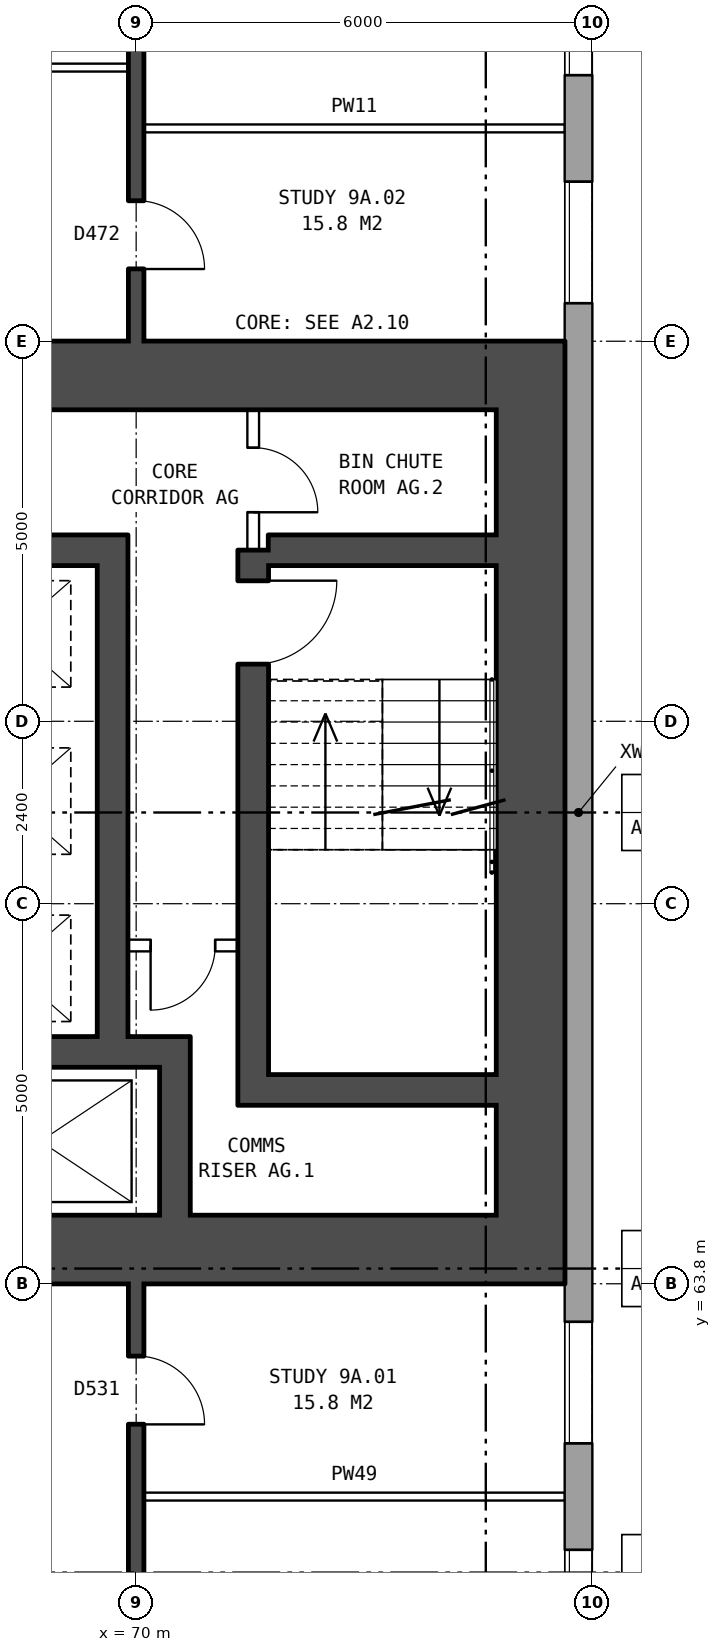
"""IFC4 building model, lengths in metres.
Left out: names, types, materials, properties, quantities, classifications, styles, units other than length and angle.
Written with IfcOpenShell. Run it as: python <this file> out.ifc"""

import sys

from ifc_helpers import new_model, si_unit, direction, frame, frame_2d, origin, place, context, subcontext, project, spatial, rectangle, extrude, element, fill, save


model = new_model("IFC4")
c1 = context("Model", 3, precision=1e-05, world=origin(), true_north=direction((0.0, 1.0)))
c2 = subcontext(c1, "Body", "Model", "MODEL_VIEW")
j1 = project(units=[si_unit("LENGTHUNIT", "METRE"), si_unit("PLANEANGLEUNIT", "RADIAN")], contexts=[c1])
p1 = place(None, origin())
s1 = spatial("IfcSite", under=j1, at=p1, CompositionType="ELEMENT")
p2 = place(p1, origin())
s2 = spatial("IfcBuilding", under=s1, at=p2, CompositionType="ELEMENT")
p3 = place(p2, frame((0.0, 0.0, 35.0)))
s3 = spatial("IfcBuildingStorey", under=s2, at=p3, CompositionType="ELEMENT", Elevation=35.0)
p4 = place(p3, frame((75.82, 57.075, 0.0), z_axis=(0.0, 0.0, 1.0), x_axis=(0.0, 1.0, 0.0)))
e1 = element("IfcWall", 1, at=p4, inside=s3, PredefinedType="STANDARD", context=c2, shape_type="SweptSolid", body=[
    extrude(rectangle(XDim=25.851, YDim=0.36, at=frame_2d((12.925, 0.0))), origin(), (0.0, 0.0, 1.0), 2.85),
])
p5 = place(p4, frame((1.625, 0.0, 0.8)))
e2 = element("IfcOpeningElement", 2, at=p5, cuts=e1, PredefinedType="OPENING", context=c2, shape_type="SweptSolid", body=[
    extrude(rectangle(XDim=1.6, YDim=1.8, at=frame_2d((0.8, 0.9))), frame((0.0, 0.19, 0.0), z_axis=(0.0, -1.0, 0.0), x_axis=(1.0, 0.0, 0.0)), (0.0, 0.0, 1.0), 0.38),
])
p6 = place(p4, frame((4.625, 0.0, 0.8)))
e3 = element("IfcOpeningElement", 3, at=p6, cuts=e1, PredefinedType="OPENING", context=c2, shape_type="SweptSolid", body=[
    extrude(rectangle(XDim=1.6, YDim=1.8, at=frame_2d((0.8, 0.9))), frame((0.0, 0.19, 0.0), z_axis=(0.0, -1.0, 0.0), x_axis=(1.0, 0.0, 0.0)), (0.0, 0.0, 1.0), 0.38),
])
p7 = place(p4, frame((19.625, 0.0, 0.8)))
e4 = element("IfcOpeningElement", 4, at=p7, cuts=e1, PredefinedType="OPENING", context=c2, shape_type="SweptSolid", body=[
    extrude(rectangle(XDim=1.6, YDim=1.8, at=frame_2d((0.8, 0.9))), frame((0.0, 0.19, 0.0), z_axis=(0.0, -1.0, 0.0), x_axis=(1.0, 0.0, 0.0)), (0.0, 0.0, 1.0), 0.38),
])
p8 = place(p4, frame((22.625, 0.0, 0.8)))
e5 = element("IfcOpeningElement", 5, at=p8, cuts=e1, PredefinedType="OPENING", context=c2, shape_type="SweptSolid", body=[
    extrude(rectangle(XDim=1.6, YDim=1.8, at=frame_2d((0.8, 0.9))), frame((0.0, 0.19, 0.0), z_axis=(0.0, -1.0, 0.0), x_axis=(1.0, 0.0, 0.0)), (0.0, 0.0, 1.0), 0.38),
])
p9 = place(p3, frame((75.19, 64.7, 0.0), z_axis=(0.0, 0.0, 1.0), x_axis=(0.0, 1.0, 0.0)))
e6 = element("IfcWall", 6, at=p9, inside=s3, PredefinedType="SHEAR", context=c2, shape_type="SweptSolid", body=[
    extrude(rectangle(XDim=10.6, YDim=0.9, at=frame_2d((5.3, 0.0))), origin(), (0.0, 0.0, 1.0), 2.85),
])
for number, where, z_axis, x_axis in (
    (7, (66.64, 64.25, 0.0), (0.0, 0.0, 1.0), (1.0, 0.0, 0.0)),
    (8, (66.64, 75.75, 0.0), (0.0, 0.0, 1.0), (1.0, 0.0, 0.0)),
):
    element("IfcWall", number, at=place(p3, frame(where, z_axis=z_axis, x_axis=x_axis)), inside=s3, PredefinedType="SHEAR", context=c2, shape_type="SweptSolid", body=[
        extrude(rectangle(XDim=9.0, YDim=0.9, at=frame_2d((4.5, 0.0))), origin(), (0.0, 0.0, 1.0), 2.85),
    ])
p10 = place(p3, frame((71.74, 66.35, 0.0), z_axis=(0.0, 0.0, 1.0), x_axis=(1.0, 0.0, 0.0)))
e9 = element("IfcWall", 9, at=p10, inside=s3, PredefinedType="SHEAR", context=c2, shape_type="SweptSolid", body=[
    extrude(rectangle(XDim=3.0, YDim=0.4, at=frame_2d((1.5, 0.0))), origin(), (0.0, 0.0, 1.0), 2.85),
])
p11 = place(p3, frame((67.54, 66.85, 0.0), z_axis=(0.0, 0.0, 1.0), x_axis=(1.0, 0.0, 0.0)))
e10 = element("IfcWall", 10, at=p11, inside=s3, PredefinedType="SHEAR", context=c2, shape_type="SweptSolid", body=[
    extrude(rectangle(XDim=3.17, YDim=0.4, at=frame_2d((1.585, 0.0))), origin(), (0.0, 0.0, 1.0), 2.85),
])
p12 = place(p3, frame((69.89, 68.25, 0.0), z_axis=(0.0, 0.0, 1.0), x_axis=(1.0, 0.0, 0.0)))
e11 = element("IfcWall", 11, at=p12, inside=s3, PredefinedType="PARTITIONING", context=c2, shape_type="SweptSolid", body=[
    extrude(rectangle(XDim=1.45, YDim=0.15, at=frame_2d((0.725, 0.0))), origin(), (0.0, 0.0, 1.0), 2.85),
])
p13 = place(p12, frame((0.3, 0.0, 0.0)))
e12 = element("IfcOpeningElement", 12, at=p13, cuts=e11, PredefinedType="OPENING", context=c2, shape_type="SweptSolid", body=[
    extrude(rectangle(XDim=0.85, YDim=2.1, at=frame_2d((0.425, 1.05))), frame((0.0, 0.085, 0.0), z_axis=(0.0, -1.0, 0.0), x_axis=(1.0, 0.0, 0.0)), (0.0, 0.0, 1.0), 0.17),
])
p14 = place(p3, frame((67.54, 73.45, 0.0), z_axis=(0.0, 0.0, 1.0), x_axis=(1.0, 0.0, 0.0)))
e13 = element("IfcWall", 13, at=p14, inside=s3, PredefinedType="SHEAR", context=c2, shape_type="SweptSolid", body=[
    extrude(rectangle(XDim=1.95, YDim=0.4, at=frame_2d((0.975, 0.0))), origin(), (0.0, 0.0, 1.0), 2.85),
])
p15 = place(p3, frame((71.74, 73.45, 0.0), z_axis=(0.0, 0.0, 1.0), x_axis=(1.0, 0.0, 0.0)))
e14 = element("IfcWall", 14, at=p15, inside=s3, PredefinedType="SHEAR", context=c2, shape_type="SweptSolid", body=[
    extrude(rectangle(XDim=3.0, YDim=0.4, at=frame_2d((1.5, 0.0))), origin(), (0.0, 0.0, 1.0), 2.85),
])
p16 = place(p3, frame((69.69, 67.05, 0.0), z_axis=(0.0, 0.0, 1.0), x_axis=(0.0, 1.0, 0.0)))
e15 = element("IfcWall", 15, at=p16, inside=s3, PredefinedType="SHEAR", context=c2, shape_type="SweptSolid", body=[
    extrude(rectangle(XDim=6.6, YDim=0.4, at=frame_2d((3.3, 0.0))), origin(), (0.0, 0.0, 1.0), 2.85),
])
p17 = place(p3, frame((70.51, 64.7, 0.0), z_axis=(0.0, 0.0, 1.0), x_axis=(0.0, 1.0, 0.0)))
e16 = element("IfcWall", 16, at=p17, inside=s3, PredefinedType="SHEAR", context=c2, shape_type="SweptSolid", body=[
    extrude(rectangle(XDim=1.95, YDim=0.4, at=frame_2d((0.975, 0.0))), origin(), (0.0, 0.0, 1.0), 2.85),
])
p18 = place(p3, frame((71.54, 66.15, 0.0), z_axis=(0.0, 0.0, 1.0), x_axis=(0.0, 1.0, 0.0)))
e17 = element("IfcWall", 17, at=p18, inside=s3, PredefinedType="SHEAR", context=c2, shape_type="SweptSolid", body=[
    extrude(rectangle(XDim=7.3, YDim=0.4, at=frame_2d((3.65, 0.0))), origin(), (0.0, 0.0, 1.0), 2.85),
])
p19 = place(p18, frame((5.8, 0.0, 0.0)))
e18 = element("IfcOpeningElement", 18, at=p19, cuts=e17, PredefinedType="OPENING", context=c2, shape_type="SweptSolid", body=[
    extrude(rectangle(XDim=1.1, YDim=2.1, at=frame_2d((0.55, 1.05))), frame((0.0, 0.21, 0.0), z_axis=(0.0, -1.0, 0.0), x_axis=(1.0, 0.0, 0.0)), (0.0, 0.0, 1.0), 0.42),
])
p20 = place(p3, frame((71.54, 73.45, 0.0), z_axis=(0.0, 0.0, 1.0), x_axis=(0.0, 1.0, 0.0)))
e19 = element("IfcWall", 19, at=p20, inside=s3, PredefinedType="PARTITIONING", context=c2, shape_type="SweptSolid", body=[
    extrude(rectangle(XDim=1.85, YDim=0.15, at=frame_2d((0.925, 0.0))), origin(), (0.0, 0.0, 1.0), 2.85),
])
p21 = place(p20, frame((0.5, 0.0, 0.0)))
e20 = element("IfcOpeningElement", 20, at=p21, cuts=e19, PredefinedType="OPENING", context=c2, shape_type="SweptSolid", body=[
    extrude(rectangle(XDim=0.85, YDim=2.1, at=frame_2d((0.425, 1.05))), frame((0.0, 0.085, 0.0), z_axis=(0.0, -1.0, 0.0), x_axis=(1.0, 0.0, 0.0)), (0.0, 0.0, 1.0), 0.17),
])
for number, where, z_axis, x_axis in (
    (21, (70.1, 61.0, 0.0), (0.0, 0.0, 1.0), (1.0, 0.0, 0.0)),
    (22, (70.1, 79.0, 0.0), (0.0, 0.0, 1.0), (1.0, 0.0, 0.0)),
):
    element("IfcWall", number, at=place(p3, frame(where, z_axis=z_axis, x_axis=x_axis)), inside=s3, PredefinedType="PARTITIONING", context=c2, shape_type="SweptSolid", body=[
        extrude(rectangle(XDim=5.54, YDim=0.1, at=frame_2d((2.77, 0.0))), origin(), (0.0, 0.0, 1.0), 2.85),
    ])
p22 = place(p3, frame((64.1, 79.8, 0.0), z_axis=(0.0, 0.0, 1.0), x_axis=(1.0, 0.0, 0.0)))
e23 = element("IfcWall", 23, at=p22, inside=s3, PredefinedType="PARTITIONING", context=c2, shape_type="SweptSolid", body=[
    extrude(rectangle(XDim=5.8, YDim=0.1, at=frame_2d((2.9, 0.0))), origin(), (0.0, 0.0, 1.0), 2.85),
])
p23 = place(p22, frame((3.6, 0.0, 0.0)))
e24 = element("IfcOpeningElement", 24, at=p23, cuts=e23, PredefinedType="OPENING", context=c2, shape_type="SweptSolid", body=[
    extrude(rectangle(XDim=0.9, YDim=2.1, at=frame_2d((0.45, 1.05))), frame((0.0, 0.06, 0.0), z_axis=(0.0, -1.0, 0.0), x_axis=(1.0, 0.0, 0.0)), (0.0, 0.0, 1.0), 0.12),
])
p24 = place(p22, frame((0.7, 0.0, 0.0)))
e25 = element("IfcOpeningElement", 25, at=p24, cuts=e23, PredefinedType="OPENING", context=c2, shape_type="SweptSolid", body=[
    extrude(rectangle(XDim=0.9, YDim=2.1, at=frame_2d((0.45, 1.05))), frame((0.0, 0.06, 0.0), z_axis=(0.0, -1.0, 0.0), x_axis=(1.0, 0.0, 0.0)), (0.0, 0.0, 1.0), 0.12),
])
p25 = place(p3, frame((70.0, 54.36, 0.0), z_axis=(0.0, 0.0, 1.0), x_axis=(0.0, 1.0, 0.0)))
e26 = element("IfcWall", 26, at=p25, inside=s3, PredefinedType="SOLIDWALL", context=c2, shape_type="SweptSolid", body=[
    extrude(rectangle(XDim=9.44, YDim=0.2, at=frame_2d((4.72, 0.0))), origin(), (0.0, 0.0, 1.0), 2.85),
])
p26 = place(p25, frame((2.32, 0.0, 0.0)))
e27 = element("IfcOpeningElement", 27, at=p26, cuts=e26, PredefinedType="OPENING", context=c2, shape_type="SweptSolid", body=[
    extrude(rectangle(XDim=0.9, YDim=2.1, at=frame_2d((0.45, 1.05))), frame((0.0, 0.11, 0.0), z_axis=(0.0, -1.0, 0.0), x_axis=(1.0, 0.0, 0.0)), (0.0, 0.0, 1.0), 0.22),
])
p27 = place(p25, frame((7.59, 0.0, 0.0)))
e28 = element("IfcOpeningElement", 28, at=p27, cuts=e26, PredefinedType="OPENING", context=c2, shape_type="SweptSolid", body=[
    extrude(rectangle(XDim=0.9, YDim=2.1, at=frame_2d((0.45, 1.05))), frame((0.0, 0.11, 0.0), z_axis=(0.0, -1.0, 0.0), x_axis=(1.0, 0.0, 0.0)), (0.0, 0.0, 1.0), 0.22),
])
p28 = place(p3, frame((70.0, 76.2, 0.0), z_axis=(0.0, 0.0, 1.0), x_axis=(0.0, 1.0, 0.0)))
e29 = element("IfcWall", 29, at=p28, inside=s3, PredefinedType="SOLIDWALL", context=c2, shape_type="SweptSolid", body=[
    extrude(rectangle(XDim=9.44, YDim=0.2, at=frame_2d((4.72, 0.0))), origin(), (0.0, 0.0, 1.0), 2.85),
])
p29 = place(p28, frame((6.07, 0.0, 0.0)))
e30 = element("IfcOpeningElement", 30, at=p29, cuts=e29, PredefinedType="OPENING", context=c2, shape_type="SweptSolid", body=[
    extrude(rectangle(XDim=0.9, YDim=2.1, at=frame_2d((0.45, 1.05))), frame((0.0, 0.11, 0.0), z_axis=(0.0, -1.0, 0.0), x_axis=(1.0, 0.0, 0.0)), (0.0, 0.0, 1.0), 0.22),
])
p30 = place(p28, frame((0.95, 0.0, 0.0)))
e31 = element("IfcOpeningElement", 31, at=p30, cuts=e29, PredefinedType="OPENING", context=c2, shape_type="SweptSolid", body=[
    extrude(rectangle(XDim=0.9, YDim=2.1, at=frame_2d((0.45, 1.05))), frame((0.0, 0.11, 0.0), z_axis=(0.0, -1.0, 0.0), x_axis=(1.0, 0.0, 0.0)), (0.0, 0.0, 1.0), 0.22),
])
p31 = place(p5, origin())
e32 = element("IfcWindow", 32, at=p31, inside=s3, PartitioningType="SINGLE_PANEL", PredefinedType="WINDOW", context=c2, shape_type="SweptSolid", body=[
    extrude(rectangle(XDim=1.6, YDim=1.8, at=frame_2d((0.8, 0.9))), frame((0.0, 0.15, 0.0), z_axis=(0.0, -1.0, 0.0), x_axis=(1.0, 0.0, 0.0)), (0.0, 0.0, 1.0), 0.06),
])
fill(e2, e32)
p32 = place(p6, origin())
e33 = element("IfcWindow", 33, at=p32, inside=s3, PartitioningType="SINGLE_PANEL", PredefinedType="WINDOW", context=c2, shape_type="SweptSolid", body=[
    extrude(rectangle(XDim=1.6, YDim=1.8, at=frame_2d((0.8, 0.9))), frame((0.0, 0.15, 0.0), z_axis=(0.0, -1.0, 0.0), x_axis=(1.0, 0.0, 0.0)), (0.0, 0.0, 1.0), 0.06),
])
fill(e3, e33)
p33 = place(p7, origin())
e34 = element("IfcWindow", 34, at=p33, inside=s3, PartitioningType="SINGLE_PANEL", PredefinedType="WINDOW", context=c2, shape_type="SweptSolid", body=[
    extrude(rectangle(XDim=1.6, YDim=1.8, at=frame_2d((0.8, 0.9))), frame((0.0, 0.15, 0.0), z_axis=(0.0, -1.0, 0.0), x_axis=(1.0, 0.0, 0.0)), (0.0, 0.0, 1.0), 0.06),
])
fill(e4, e34)
p34 = place(p8, origin())
e35 = element("IfcWindow", 35, at=p34, inside=s3, PartitioningType="SINGLE_PANEL", PredefinedType="WINDOW", context=c2, shape_type="SweptSolid", body=[
    extrude(rectangle(XDim=1.6, YDim=1.8, at=frame_2d((0.8, 0.9))), frame((0.0, 0.15, 0.0), z_axis=(0.0, -1.0, 0.0), x_axis=(1.0, 0.0, 0.0)), (0.0, 0.0, 1.0), 0.06),
])
fill(e5, e35)
p35 = place(p19, frame((1.1, 0.0, 0.0), z_axis=(0.0, 0.0, 1.0), x_axis=(-1.0, 0.0, 0.0)))
e36 = element("IfcDoor", 36, at=p35, inside=s3, OperationType="SINGLE_SWING_LEFT", PredefinedType="DOOR", context=c2, shape_type="SweptSolid", body=[
    extrude(rectangle(XDim=1.1, YDim=2.1, at=frame_2d((0.55, 1.05))), frame((0.0, 0.025, 0.0), z_axis=(0.0, -1.0, 0.0), x_axis=(1.0, 0.0, 0.0)), (0.0, 0.0, 1.0), 0.05),
])
fill(e18, e36)
p36 = place(p13, frame((0.85, 0.0, 0.0), z_axis=(0.0, 0.0, 1.0), x_axis=(-1.0, 0.0, 0.0)))
e37 = element("IfcDoor", 37, at=p36, inside=s3, OperationType="SINGLE_SWING_RIGHT", PredefinedType="DOOR", context=c2, shape_type="SweptSolid", body=[
    extrude(rectangle(XDim=0.85, YDim=2.1, at=frame_2d((0.425, 1.05))), frame((0.0, 0.025, 0.0), z_axis=(0.0, -1.0, 0.0), x_axis=(1.0, 0.0, 0.0)), (0.0, 0.0, 1.0), 0.05),
])
fill(e12, e37)
p37 = place(p21, frame((0.85, 0.0, 0.0), z_axis=(0.0, 0.0, 1.0), x_axis=(-1.0, 0.0, 0.0)))
e38 = element("IfcDoor", 38, at=p37, inside=s3, OperationType="SINGLE_SWING_RIGHT", PredefinedType="DOOR", context=c2, shape_type="SweptSolid", body=[
    extrude(rectangle(XDim=0.85, YDim=2.1, at=frame_2d((0.425, 1.05))), frame((0.0, 0.025, 0.0), z_axis=(0.0, -1.0, 0.0), x_axis=(1.0, 0.0, 0.0)), (0.0, 0.0, 1.0), 0.05),
])
fill(e20, e38)
p38 = place(p27, frame((0.9, 0.0, 0.0), z_axis=(0.0, 0.0, 1.0), x_axis=(-1.0, 0.0, 0.0)))
e39 = element("IfcDoor", 39, at=p38, inside=s3, OperationType="SINGLE_SWING_RIGHT", PredefinedType="DOOR", context=c2, shape_type="SweptSolid", body=[
    extrude(rectangle(XDim=0.9, YDim=2.1, at=frame_2d((0.45, 1.05))), frame((0.0, 0.025, 0.0), z_axis=(0.0, -1.0, 0.0), x_axis=(1.0, 0.0, 0.0)), (0.0, 0.0, 1.0), 0.05),
])
fill(e28, e39)
p39 = place(p30, frame((0.9, 0.0, 0.0), z_axis=(0.0, 0.0, 1.0), x_axis=(-1.0, 0.0, 0.0)))
e40 = element("IfcDoor", 40, at=p39, inside=s3, OperationType="SINGLE_SWING_RIGHT", PredefinedType="DOOR", context=c2, shape_type="SweptSolid", body=[
    extrude(rectangle(XDim=0.9, YDim=2.1, at=frame_2d((0.45, 1.05))), frame((0.0, 0.025, 0.0), z_axis=(0.0, -1.0, 0.0), x_axis=(1.0, 0.0, 0.0)), (0.0, 0.0, 1.0), 0.05),
])
fill(e31, e40)
save(model, sys.argv[1])
